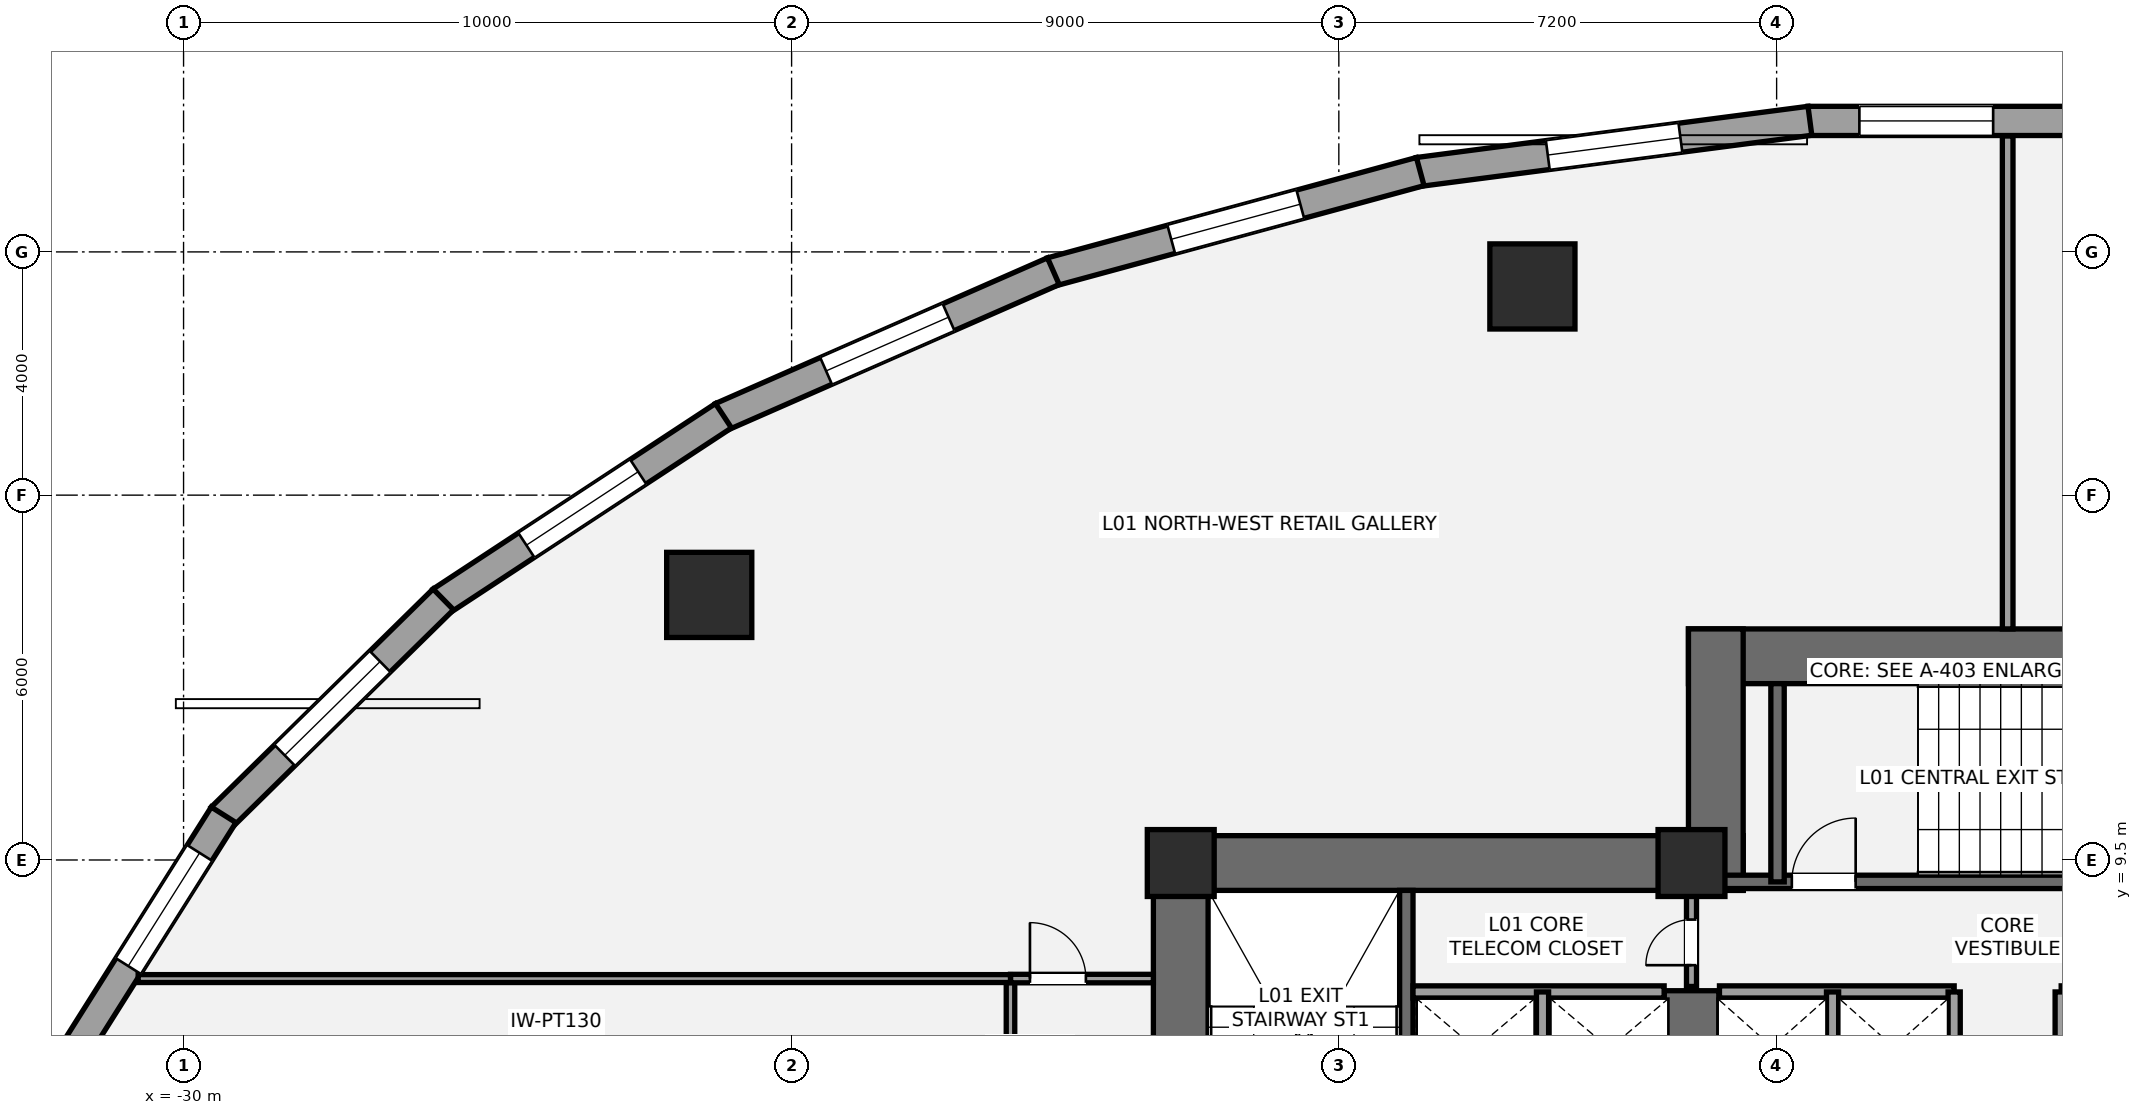
"""IFC4 building model, lengths in metres.
Left out: names, types, materials, properties, quantities, classifications, styles, units other than length and angle.
Written with IfcOpenShell. Run it as: python <this file> out.ifc"""

import sys

from ifc_helpers import new_model, si_unit, direction, frame, frame_2d, origin, origin_2d, place, context, subcontext, project, spatial, rectangle, hollow_circle, extrude, element, fill, save


model = new_model("IFC4")
c1 = context("Model", 3, precision=1e-05, world=origin(), true_north=direction((0.0, 1.0)))
c2 = subcontext(c1, "Body", "Model", "MODEL_VIEW")
j1 = project(units=[si_unit("LENGTHUNIT", "METRE"), si_unit("PLANEANGLEUNIT", "RADIAN")], contexts=[c1])
p1 = place(None, origin())
s1 = spatial("IfcSite", under=j1, at=p1, CompositionType="ELEMENT")
p2 = place(p1, origin())
s2 = spatial("IfcBuilding", under=s1, at=p2, CompositionType="ELEMENT")
p3 = place(p2, frame((0.0, 0.0, 6.0)))
s3 = spatial("IfcBuildingStorey", under=s2, at=p3, CompositionType="ELEMENT", Elevation=6.0)
p4 = place(p3, frame((-13.6, 0.95, 0.0), z_axis=(0.0, 0.0, 1.0), x_axis=(0.0, 1.0, 0.0)))
e1 = element("IfcWall", 1, at=p4, inside=s3, PredefinedType="SHEAR", context=c2, shape_type="SweptSolid", body=[
    extrude(rectangle(XDim=8.95, YDim=0.9, at=frame_2d((4.475, 0.0))), origin(), (0.0, 0.0, 1.0), 4.2),
])
p5 = place(p3, frame((-14.05, 9.45, 0.0), z_axis=(0.0, 0.0, 1.0), x_axis=(1.0, 0.0, 0.0)))
e2 = element("IfcWall", 2, at=p5, inside=s3, PredefinedType="SHEAR", context=c2, shape_type="SweptSolid", body=[
    extrude(rectangle(XDim=9.7, YDim=0.9, at=frame_2d((4.85, 0.0))), origin(), (0.0, 0.0, 1.0), 4.2),
])
p6 = place(p3, frame((-5.2, 5.35, 0.0), z_axis=(0.0, 0.0, 1.0), x_axis=(0.0, 1.0, 0.0)))
e3 = element("IfcWall", 3, at=p6, inside=s3, PredefinedType="SHEAR", context=c2, shape_type="SweptSolid", body=[
    extrude(rectangle(XDim=2.0, YDim=0.9, at=frame_2d((1.0, 0.0))), origin(), (0.0, 0.0, 1.0), 4.2),
])
p7 = place(p3, frame((-9.89, 1.85, 0.0), z_axis=(0.0, 0.0, 1.0), x_axis=(0.0, 1.0, 0.0)))
e4 = element("IfcWall", 4, at=p7, inside=s3, PredefinedType="SHEAR", context=c2, shape_type="SweptSolid", body=[
    extrude(rectangle(XDim=7.15, YDim=0.22, at=frame_2d((3.575, 0.0))), origin(), (0.0, 0.0, 1.0), 4.2),
])
p8 = place(p3, frame((-5.25, 12.85, 0.0), z_axis=(0.0, 0.0, 1.0), x_axis=(1.0, 0.0, 0.0)))
e5 = element("IfcWall", 5, at=p8, inside=s3, PredefinedType="SHEAR", context=c2, shape_type="SweptSolid", body=[
    extrude(rectangle(XDim=10.5, YDim=0.9, at=frame_2d((5.25, 0.0))), origin(), (0.0, 0.0, 1.0), 4.2),
])
p9 = place(p3, frame((-4.8, 9.0, 0.0), z_axis=(0.0, 0.0, 1.0), x_axis=(0.0, 1.0, 0.0)))
e6 = element("IfcWall", 6, at=p9, inside=s3, PredefinedType="SHEAR", context=c2, shape_type="SweptSolid", body=[
    extrude(rectangle(XDim=4.3, YDim=0.9, at=frame_2d((2.15, 0.0))), origin(), (0.0, 0.0, 1.0), 4.2),
])
p10 = place(p3, frame((-4.7, 9.14, 0.0), z_axis=(0.0, 0.0, 1.0), x_axis=(1.0, 0.0, 0.0)))
e7 = element("IfcWall", 7, at=p10, inside=s3, PredefinedType="SHEAR", context=c2, shape_type="SweptSolid", body=[
    extrude(rectangle(XDim=9.3, YDim=0.22, at=frame_2d((4.65, 0.0))), origin(), (0.0, 0.0, 1.0), 4.2),
])
p11 = place(p10, frame((1.15, 0.0, 0.0)))
e8 = element("IfcOpeningElement", 8, at=p11, cuts=e7, PredefinedType="OPENING", context=c2, shape_type="SweptSolid", body=[
    extrude(rectangle(XDim=1.05, YDim=2.15, at=frame_2d((0.525, 1.075))), frame((0.0, 0.12, 0.0), z_axis=(0.0, -1.0, 0.0), x_axis=(1.0, 0.0, 0.0)), (0.0, 0.0, 1.0), 0.24),
])
p12 = place(p3, frame((-3.785, 9.14, 0.0), z_axis=(0.0, 0.0, 1.0), x_axis=(0.0, 1.0, 0.0)))
e9 = element("IfcWall", 9, at=p12, inside=s3, PredefinedType="SHEAR", context=c2, shape_type="SweptSolid", body=[
    extrude(rectangle(XDim=3.26, YDim=0.22, at=frame_2d((1.63, 0.0))), origin(), (0.0, 0.0, 1.0), 4.2),
])
for number, where, z_axis, x_axis in (
    (10, (-13.6, 9.45, 0.0), (0.0, 0.0, 1.0), (1.0, 0.0, 0.0)),
    (11, (-5.2, 9.45, 0.0), (0.0, 0.0, 1.0), (1.0, 0.0, 0.0)),
):
    element("IfcColumn", number, at=place(p3, frame(where, z_axis=z_axis, x_axis=x_axis)), inside=s3, PredefinedType="COLUMN", context=c2, shape_type="SweptSolid", body=[
        extrude(rectangle(XDim=1.1, YDim=1.1, at=origin_2d()), origin(), (0.0, 0.0, 1.0), 4.2),
    ])
for number, where, z_axis, x_axis in (
    (12, (-7.816, 18.932, 0.0), (0.0, 0.0, 1.0), (1.0, 0.0, 0.0)),
    (13, (-21.354, 13.859, 0.0), (0.0, 0.0, 1.0), (1.0, 0.0, 0.0)),
):
    element("IfcColumn", number, at=place(p3, frame(where, z_axis=z_axis, x_axis=x_axis)), inside=s3, PredefinedType="USERDEFINED", context=c2, shape_type="SweptSolid", body=[
        extrude(hollow_circle(Radius=0.7, WallThickness=0.05, at=origin_2d()), origin(), (0.0, 0.0, 1.0), 4.2),
    ])
p13 = place(p3, frame((-3.284, 21.654, 0.0), z_axis=(0.0, 0.0, 1.0), x_axis=(1.0, 0.0, 0.0)))
e14 = element("IfcWall", 14, at=p13, inside=s3, PredefinedType="STANDARD", context=c2, shape_type="SweptSolid", body=[
    extrude(rectangle(XDim=6.567, YDim=0.48, at=frame_2d((3.284, 0.0))), origin(), (0.0, 0.0, 1.0), 3.109),
])
p14 = place(p13, frame((0.845, 0.0, 0.7)))
e15 = element("IfcOpeningElement", 15, at=p14, cuts=e14, PredefinedType="OPENING", context=c2, shape_type="SweptSolid", body=[
    extrude(rectangle(XDim=2.2, YDim=1.95, at=frame_2d((1.1, 0.975))), frame((0.0, 0.25, 0.0), z_axis=(0.0, -1.0, 0.0), x_axis=(1.0, 0.0, 0.0)), (0.0, 0.0, 1.0), 0.5),
])
p15 = place(p3, frame((-9.693, 20.815, 0.0), z_axis=(0.0, 0.0, 1.0), x_axis=(0.991576921472, 0.129519144545, 0.0)))
e16 = element("IfcWall", 16, at=p15, inside=s3, PredefinedType="STANDARD", context=c2, shape_type="SweptSolid", body=[
    extrude(rectangle(XDim=6.496, YDim=0.48, at=frame_2d((3.248, 0.0))), origin(), (0.0, 0.0, 1.0), 3.109),
])
p16 = place(p15, frame((2.148, 0.0, 0.7)))
e17 = element("IfcOpeningElement", 17, at=p16, cuts=e16, PredefinedType="OPENING", context=c2, shape_type="SweptSolid", body=[
    extrude(rectangle(XDim=2.2, YDim=1.95, at=frame_2d((1.1, 0.975))), frame((0.0, 0.25, 0.0), z_axis=(0.0, -1.0, 0.0), x_axis=(1.0, 0.0, 0.0)), (0.0, 0.0, 1.0), 0.5),
])
p17 = place(p3, frame((-15.729, 19.171, 0.0), z_axis=(0.0, 0.0, 1.0), x_axis=(0.964936550718, 0.262483243445, 0.0)))
e18 = element("IfcWall", 18, at=p17, inside=s3, PredefinedType="STANDARD", context=c2, shape_type="SweptSolid", body=[
    extrude(rectangle(XDim=6.288, YDim=0.48, at=frame_2d((3.144, 0.0))), origin(), (0.0, 0.0, 1.0), 3.109),
])
p18 = place(p17, frame((2.044, 0.0, 0.7)))
e19 = element("IfcOpeningElement", 19, at=p18, cuts=e18, PredefinedType="OPENING", context=c2, shape_type="SweptSolid", body=[
    extrude(rectangle(XDim=2.2, YDim=1.95, at=frame_2d((1.1, 0.975))), frame((0.0, 0.25, 0.0), z_axis=(0.0, -1.0, 0.0), x_axis=(1.0, 0.0, 0.0)), (0.0, 0.0, 1.0), 0.5),
])
p19 = place(p3, frame((-21.156, 16.786, 0.0), z_axis=(0.0, 0.0, 1.0), x_axis=(0.91570760638, 0.401845218484, 0.0)))
e20 = element("IfcWall", 20, at=p19, inside=s3, PredefinedType="STANDARD", context=c2, shape_type="SweptSolid", body=[
    extrude(rectangle(XDim=5.963, YDim=0.48, at=frame_2d((2.981, 0.0))), origin(), (0.0, 0.0, 1.0), 3.109),
])
p20 = place(p19, frame((1.882, 0.0, 0.7)))
e21 = element("IfcOpeningElement", 21, at=p20, cuts=e20, PredefinedType="OPENING", context=c2, shape_type="SweptSolid", body=[
    extrude(rectangle(XDim=2.2, YDim=1.95, at=frame_2d((1.1, 0.975))), frame((0.0, 0.25, 0.0), z_axis=(0.0, -1.0, 0.0), x_axis=(1.0, 0.0, 0.0)), (0.0, 0.0, 1.0), 0.5),
])
p21 = place(p3, frame((-25.764, 13.756, 0.0), z_axis=(0.0, 0.0, 1.0), x_axis=(0.835863918172, 0.548936708827, 0.0)))
e22 = element("IfcWall", 22, at=p21, inside=s3, PredefinedType="STANDARD", context=c2, shape_type="SweptSolid", body=[
    extrude(rectangle(XDim=5.555, YDim=0.48, at=frame_2d((2.778, 0.0))), origin(), (0.0, 0.0, 1.0), 3.109),
])
p22 = place(p21, frame((1.678, 0.0, 0.7)))
e23 = element("IfcOpeningElement", 23, at=p22, cuts=e22, PredefinedType="OPENING", context=c2, shape_type="SweptSolid", body=[
    extrude(rectangle(XDim=2.2, YDim=1.95, at=frame_2d((1.1, 0.975))), frame((0.0, 0.25, 0.0), z_axis=(0.0, -1.0, 0.0), x_axis=(1.0, 0.0, 0.0)), (0.0, 0.0, 1.0), 0.5),
])
p23 = place(p3, frame((-29.376, 10.199, 0.0), z_axis=(0.0, 0.0, 1.0), x_axis=(0.713189080178, 0.700971708355, 0.0)))
e24 = element("IfcWall", 24, at=p23, inside=s3, PredefinedType="STANDARD", context=c2, shape_type="SweptSolid", body=[
    extrude(rectangle(XDim=5.116, YDim=0.48, at=frame_2d((2.558, 0.0))), origin(), (0.0, 0.0, 1.0), 3.109),
])
p24 = place(p23, frame((1.458, 0.0, 0.7)))
e25 = element("IfcOpeningElement", 25, at=p24, cuts=e24, PredefinedType="OPENING", context=c2, shape_type="SweptSolid", body=[
    extrude(rectangle(XDim=2.2, YDim=1.95, at=frame_2d((1.1, 0.975))), frame((0.0, 0.25, 0.0), z_axis=(0.0, -1.0, 0.0), x_axis=(1.0, 0.0, 0.0)), (0.0, 0.0, 1.0), 0.5),
])
p25 = place(p3, frame((-31.854, 6.258, 0.0), z_axis=(0.0, 0.0, 1.0), x_axis=(0.53349762721, 0.845801561693, 0.0)))
e26 = element("IfcWall", 26, at=p25, inside=s3, PredefinedType="STANDARD", context=c2, shape_type="SweptSolid", body=[
    extrude(rectangle(XDim=4.711, YDim=0.48, at=frame_2d((2.355, 0.0))), origin(), (0.0, 0.0, 1.0), 3.109),
])
p26 = place(p25, frame((1.771, 0.0, 0.7)))
e27 = element("IfcOpeningElement", 27, at=p26, cuts=e26, PredefinedType="OPENING", context=c2, shape_type="SweptSolid", body=[
    extrude(rectangle(XDim=2.2, YDim=1.95, at=frame_2d((1.1, 0.975))), frame((0.0, 0.25, 0.0), z_axis=(0.0, -1.0, 0.0), x_axis=(1.0, 0.0, 0.0)), (0.0, 0.0, 1.0), 0.5),
])
p27 = place(p3, frame((-9.78, 7.33, 0.0), z_axis=(0.0, 0.0, 1.0), x_axis=(1.0, 0.0, 0.0)))
e28 = element("IfcWall", 28, at=p27, inside=s3, PredefinedType="SOLIDWALL", context=c2, shape_type="SweptSolid", body=[
    extrude(rectangle(XDim=4.13, YDim=0.2, at=frame_2d((2.065, 0.0))), origin(), (0.0, 0.0, 1.0), 3.98),
])
p28 = place(p3, frame((-7.65, 5.47, 0.0), z_axis=(0.0, 0.0, 1.0), x_axis=(0.0, 1.0, 0.0)))
e29 = element("IfcWall", 29, at=p28, inside=s3, PredefinedType="SOLIDWALL", context=c2, shape_type="SweptSolid", body=[
    extrude(rectangle(XDim=1.86, YDim=0.2, at=frame_2d((0.93, 0.0))), origin(), (0.0, 0.0, 1.0), 3.98),
])
for number, where, z_axis, x_axis in (
    (30, (-4.74, 7.33, 0.0), (0.0, 0.0, 1.0), (1.0, 0.0, 0.0)),
    (31, (0.88, 7.33, 0.0), (0.0, 0.0, 1.0), (1.0, 0.0, 0.0)),
):
    element("IfcWall", number, at=place(p3, frame(where, z_axis=z_axis, x_axis=x_axis)), inside=s3, PredefinedType="SOLIDWALL", context=c2, shape_type="SweptSolid", body=[
        extrude(rectangle(XDim=3.86, YDim=0.2, at=frame_2d((1.93, 0.0))), origin(), (0.0, 0.0, 1.0), 3.98),
    ])
for number, where, z_axis, x_axis in (
    (32, (-2.88, 5.52, 0.0), (0.0, 0.0, 1.0), (0.0, 1.0, 0.0)),
    (33, (-0.88, 5.52, 0.0), (0.0, 0.0, 1.0), (0.0, 1.0, 0.0)),
    (34, (0.88, 5.52, 0.0), (0.0, 0.0, 1.0), (0.0, 1.0, 0.0)),
):
    element("IfcWall", number, at=place(p3, frame(where, z_axis=z_axis, x_axis=x_axis)), inside=s3, PredefinedType="SOLIDWALL", context=c2, shape_type="SweptSolid", body=[
        extrude(rectangle(XDim=1.81, YDim=0.2, at=frame_2d((0.905, 0.0))), origin(), (0.0, 0.0, 1.0), 3.98),
    ])
p29 = place(p3, frame((-5.2, 7.42, 0.0), z_axis=(0.0, 0.0, 1.0), x_axis=(0.0, 1.0, 0.0)))
e35 = element("IfcWall", 35, at=p29, inside=s3, PredefinedType="PARTITIONING", context=c2, shape_type="SweptSolid", body=[
    extrude(rectangle(XDim=1.58, YDim=0.165, at=frame_2d((0.79, 0.0))), origin(), (0.0, 0.0, 1.0), 3.98),
])
p30 = place(p29, frame((0.35, 0.0, 0.0)))
e36 = element("IfcOpeningElement", 36, at=p30, cuts=e35, PredefinedType="OPENING", context=c2, shape_type="SweptSolid", body=[
    extrude(rectangle(XDim=0.75, YDim=2.1, at=frame_2d((0.375, 1.05))), frame((0.0, 0.093, 0.0), z_axis=(0.0, -1.0, 0.0), x_axis=(1.0, 0.0, 0.0)), (0.0, 0.0, 1.0), 0.185),
])
p31 = place(p3, frame((-16.4, -18.603, 0.0), z_axis=(0.0, 0.0, 1.0), x_axis=(0.0, 1.0, 0.0)))
e37 = element("IfcWall", 37, at=p31, inside=s3, PredefinedType="PARTITIONING", context=c2, shape_type="SweptSolid", body=[
    extrude(rectangle(XDim=26.153, YDim=0.14, at=frame_2d((13.076, 0.0))), origin(), (0.0, 0.0, 1.0), 3.348),
])
p32 = place(p31, frame((14.802, 0.0, 0.0)))
e38 = element("IfcOpeningElement", 38, at=p32, cuts=e37, PredefinedType="OPENING", context=c2, shape_type="SweptSolid", body=[
    extrude(rectangle(XDim=0.9, YDim=2.1, at=frame_2d((0.45, 1.05))), frame((0.0, 0.08, 0.0), z_axis=(0.0, -1.0, 0.0), x_axis=(1.0, 0.0, 0.0)), (0.0, 0.0, 1.0), 0.16),
])
p33 = place(p31, frame((19.552, 0.0, 0.0)))
e39 = element("IfcOpeningElement", 39, at=p33, cuts=e37, PredefinedType="OPENING", context=c2, shape_type="SweptSolid", body=[
    extrude(rectangle(XDim=0.9, YDim=2.1, at=frame_2d((0.45, 1.05))), frame((0.0, 0.08, 0.0), z_axis=(0.0, -1.0, 0.0), x_axis=(1.0, 0.0, 0.0)), (0.0, 0.0, 1.0), 0.16),
])
p34 = place(p31, frame((23.827, 0.0, 0.0)))
e40 = element("IfcOpeningElement", 40, at=p34, cuts=e37, PredefinedType="OPENING", context=c2, shape_type="SweptSolid", body=[
    extrude(rectangle(XDim=0.9, YDim=2.1, at=frame_2d((0.45, 1.05))), frame((0.0, 0.08, 0.0), z_axis=(0.0, -1.0, 0.0), x_axis=(1.0, 0.0, 0.0)), (0.0, 0.0, 1.0), 0.16),
])
p35 = place(p3, frame((-16.4, 7.55, 0.0), z_axis=(0.0, 0.0, 1.0), x_axis=(1.0, 0.0, 0.0)))
e41 = element("IfcWall", 41, at=p35, inside=s3, PredefinedType="PARTITIONING", context=c2, shape_type="SweptSolid", body=[
    extrude(rectangle(XDim=2.35, YDim=0.14, at=frame_2d((1.175, 0.0))), origin(), (0.0, 0.0, 1.0), 3.433),
])
p36 = place(p35, frame((0.32, 0.0, 0.0)))
e42 = element("IfcOpeningElement", 42, at=p36, cuts=e41, PredefinedType="OPENING", context=c2, shape_type="SweptSolid", body=[
    extrude(rectangle(XDim=0.92, YDim=2.15, at=frame_2d((0.46, 1.075))), frame((0.0, 0.08, 0.0), z_axis=(0.0, -1.0, 0.0), x_axis=(1.0, 0.0, 0.0)), (0.0, 0.0, 1.0), 0.16),
])
p37 = place(p3, frame((0.0, 13.3, 0.0), z_axis=(0.0, 0.0, 1.0), x_axis=(0.0, 1.0, 0.0)))
e43 = element("IfcWall", 43, at=p37, inside=s3, PredefinedType="PARTITIONING", context=c2, shape_type="SweptSolid", body=[
    extrude(rectangle(XDim=8.106, YDim=0.175, at=frame_2d((4.053, 0.0))), origin(), (0.0, 0.0, 1.0), 3.98),
])
p38 = place(p3, frame((-30.747, 7.55, 0.0), z_axis=(0.0, 0.0, 1.0), x_axis=(1.0, 0.0, 0.0)))
e44 = element("IfcWall", 44, at=p38, inside=s3, PredefinedType="PARTITIONING", context=c2, shape_type="SweptSolid", body=[
    extrude(rectangle(XDim=14.347, YDim=0.13, at=frame_2d((7.173, 0.0))), origin(), (0.0, 0.0, 1.0), 2.958),
])
p39 = place(p14, origin())
e45 = element("IfcWindow", 45, at=p39, inside=s3, PartitioningType="SINGLE_PANEL", PredefinedType="WINDOW", context=c2, shape_type="SweptSolid", body=[
    extrude(rectangle(XDim=2.2, YDim=1.95, at=frame_2d((1.1, 0.975))), frame((0.0, -0.01, 0.0), z_axis=(0.0, -1.0, 0.0), x_axis=(1.0, 0.0, 0.0)), (0.0, 0.0, 1.0), 0.06),
])
fill(e15, e45)
p40 = place(p16, origin())
e46 = element("IfcWindow", 46, at=p40, inside=s3, PartitioningType="SINGLE_PANEL", PredefinedType="WINDOW", context=c2, shape_type="SweptSolid", body=[
    extrude(rectangle(XDim=2.2, YDim=1.95, at=frame_2d((1.1, 0.975))), frame((0.0, -0.01, 0.0), z_axis=(0.0, -1.0, 0.0), x_axis=(1.0, 0.0, 0.0)), (0.0, 0.0, 1.0), 0.06),
])
fill(e17, e46)
p41 = place(p18, origin())
e47 = element("IfcWindow", 47, at=p41, inside=s3, PartitioningType="SINGLE_PANEL", PredefinedType="WINDOW", context=c2, shape_type="SweptSolid", body=[
    extrude(rectangle(XDim=2.2, YDim=1.95, at=frame_2d((1.1, 0.975))), frame((0.0, -0.01, 0.0), z_axis=(0.0, -1.0, 0.0), x_axis=(1.0, 0.0, 0.0)), (0.0, 0.0, 1.0), 0.06),
])
fill(e19, e47)
p42 = place(p20, origin())
e48 = element("IfcWindow", 48, at=p42, inside=s3, PartitioningType="SINGLE_PANEL", PredefinedType="WINDOW", context=c2, shape_type="SweptSolid", body=[
    extrude(rectangle(XDim=2.2, YDim=1.95, at=frame_2d((1.1, 0.975))), frame((0.0, -0.01, 0.0), z_axis=(0.0, -1.0, 0.0), x_axis=(1.0, 0.0, 0.0)), (0.0, 0.0, 1.0), 0.06),
])
fill(e21, e48)
p43 = place(p22, origin())
e49 = element("IfcWindow", 49, at=p43, inside=s3, PartitioningType="SINGLE_PANEL", PredefinedType="WINDOW", context=c2, shape_type="SweptSolid", body=[
    extrude(rectangle(XDim=2.2, YDim=1.95, at=frame_2d((1.1, 0.975))), frame((0.0, -0.01, 0.0), z_axis=(0.0, -1.0, 0.0), x_axis=(1.0, 0.0, 0.0)), (0.0, 0.0, 1.0), 0.06),
])
fill(e23, e49)
p44 = place(p24, origin())
e50 = element("IfcWindow", 50, at=p44, inside=s3, PartitioningType="SINGLE_PANEL", PredefinedType="WINDOW", context=c2, shape_type="SweptSolid", body=[
    extrude(rectangle(XDim=2.2, YDim=1.95, at=frame_2d((1.1, 0.975))), frame((0.0, -0.01, 0.0), z_axis=(0.0, -1.0, 0.0), x_axis=(1.0, 0.0, 0.0)), (0.0, 0.0, 1.0), 0.06),
])
fill(e25, e50)
p45 = place(p26, origin())
e51 = element("IfcWindow", 51, at=p45, inside=s3, PartitioningType="SINGLE_PANEL", PredefinedType="WINDOW", context=c2, shape_type="SweptSolid", body=[
    extrude(rectangle(XDim=2.2, YDim=1.95, at=frame_2d((1.1, 0.975))), frame((0.0, -0.01, 0.0), z_axis=(0.0, -1.0, 0.0), x_axis=(1.0, 0.0, 0.0)), (0.0, 0.0, 1.0), 0.06),
])
fill(e27, e51)
p46 = place(p11, origin())
e52 = element("IfcDoor", 52, at=p46, inside=s3, OperationType="SINGLE_SWING_RIGHT", PredefinedType="DOOR", context=c2, shape_type="SweptSolid", body=[
    extrude(rectangle(XDim=1.05, YDim=2.15, at=frame_2d((0.525, 1.075))), frame((0.0, 0.025, 0.0), z_axis=(0.0, -1.0, 0.0), x_axis=(1.0, 0.0, 0.0)), (0.0, 0.0, 1.0), 0.05),
])
fill(e8, e52)
p47 = place(p30, origin())
e53 = element("IfcDoor", 53, at=p47, inside=s3, OperationType="SINGLE_SWING_LEFT", PredefinedType="DOOR", context=c2, shape_type="SweptSolid", body=[
    extrude(rectangle(XDim=0.75, YDim=2.1, at=frame_2d((0.375, 1.05))), frame((0.0, 0.025, 0.0), z_axis=(0.0, -1.0, 0.0), x_axis=(1.0, 0.0, 0.0)), (0.0, 0.0, 1.0), 0.05),
])
fill(e36, e53)
p48 = place(p36, origin())
e54 = element("IfcDoor", 54, at=p48, inside=s3, OperationType="SINGLE_SWING_LEFT", PredefinedType="DOOR", context=c2, shape_type="SweptSolid", body=[
    extrude(rectangle(XDim=0.92, YDim=2.15, at=frame_2d((0.46, 1.075))), frame((0.0, 0.025, 0.0), z_axis=(0.0, -1.0, 0.0), x_axis=(1.0, 0.0, 0.0)), (0.0, 0.0, 1.0), 0.05),
])
fill(e42, e54)
save(model, sys.argv[1])
